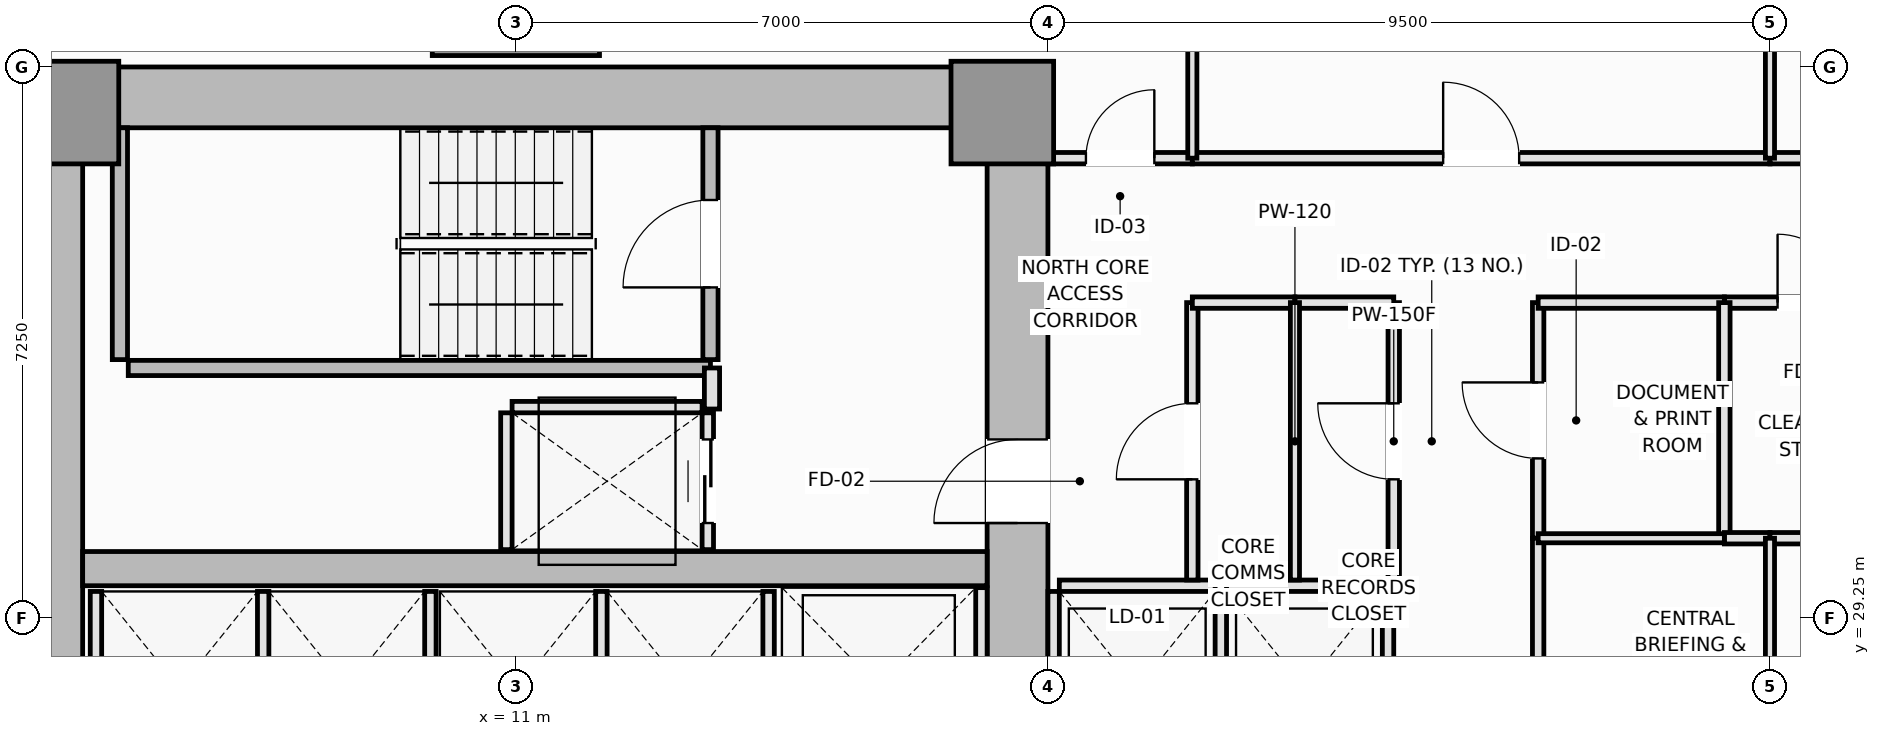
"""IFC4 building model, lengths in metres.
Left out: names, types, materials, properties, quantities, classifications, styles, units other than length and angle.
Written with IfcOpenShell. Run it as: python <this file> out.ifc"""

import sys

from ifc_helpers import new_model, si_unit, direction, frame, frame_2d, origin, origin_2d, place, context, subcontext, project, spatial, rectangle, extrude, element, fill, save


model = new_model("IFC4")
c1 = context("Model", 3, precision=1e-05, world=origin(), true_north=direction((0.0, 1.0)))
c2 = subcontext(c1, "Body", "Model", "MODEL_VIEW")
j1 = project(units=[si_unit("LENGTHUNIT", "METRE"), si_unit("PLANEANGLEUNIT", "RADIAN")], contexts=[c1])
p1 = place(None, origin())
s1 = spatial("IfcSite", under=j1, at=p1, CompositionType="ELEMENT")
p2 = place(p1, origin())
s2 = spatial("IfcBuilding", under=s1, at=p2, CompositionType="ELEMENT")
p3 = place(p2, frame((0.0, 0.0, 36.25)))
s3 = spatial("IfcBuildingStorey", under=s2, at=p3, CompositionType="ELEMENT", Elevation=36.25)
p4 = place(p3, frame((4.5, 36.1, 0.0), z_axis=(0.0, 0.0, 1.0), x_axis=(1.0, 0.0, 0.0)))
e1 = element("IfcWall", 1, at=p4, inside=s3, PredefinedType="SHEAR", context=c2, shape_type="SweptSolid", body=[
    extrude(rectangle(XDim=13.5, YDim=0.8, at=frame_2d((6.75, 0.0))), origin(), (0.0, 0.0, 1.0), 3.55),
])
p5 = place(p3, frame((4.9, 14.8, 0.0), z_axis=(0.0, 0.0, 1.0), x_axis=(0.0, 1.0, 0.0)))
e2 = element("IfcWall", 2, at=p5, inside=s3, PredefinedType="SHEAR", context=c2, shape_type="SweptSolid", body=[
    extrude(rectangle(XDim=20.9, YDim=0.8, at=frame_2d((10.45, 0.0))), origin(), (0.0, 0.0, 1.0), 3.55),
])
p6 = place(p3, frame((17.6, 27.05, 0.0), z_axis=(0.0, 0.0, 1.0), x_axis=(0.0, 1.0, 0.0)))
e3 = element("IfcWall", 3, at=p6, inside=s3, PredefinedType="SHEAR", context=c2, shape_type="SweptSolid", body=[
    extrude(rectangle(XDim=8.65, YDim=0.8, at=frame_2d((4.325, 0.0))), origin(), (0.0, 0.0, 1.0), 3.55),
])
p7 = place(p6, frame((3.45, 0.0, 0.0)))
e4 = element("IfcOpeningElement", 4, at=p7, cuts=e3, PredefinedType="OPENING", context=c2, shape_type="SweptSolid", body=[
    extrude(rectangle(XDim=1.1, YDim=2.15, at=frame_2d((0.55, 1.075))), frame((0.0, 0.41, 0.0), z_axis=(0.0, -1.0, 0.0), x_axis=(1.0, 0.0, 0.0)), (0.0, 0.0, 1.0), 0.82),
])
p8 = place(p3, frame((5.3, 29.9, 0.0), z_axis=(0.0, 0.0, 1.0), x_axis=(1.0, 0.0, 0.0)))
e5 = element("IfcWall", 5, at=p8, inside=s3, PredefinedType="SHEAR", context=c2, shape_type="SweptSolid", body=[
    extrude(rectangle(XDim=11.9, YDim=0.45, at=frame_2d((5.95, 0.0))), origin(), (0.0, 0.0, 1.0), 3.55),
])
for number, where, z_axis, x_axis in (
    (6, (5.1, 35.9, 0.0), (0.0, 0.0, 1.0), (1.0, 0.0, 0.0)),
    (7, (17.4, 35.9, 0.0), (0.0, 0.0, 1.0), (1.0, 0.0, 0.0)),
):
    element("IfcColumn", number, at=place(p3, frame(where, z_axis=z_axis, x_axis=x_axis)), inside=s3, PredefinedType="PILASTER", context=c2, shape_type="SweptSolid", body=[
        extrude(rectangle(XDim=1.35, YDim=1.35, at=origin_2d()), origin(), (0.0, 0.0, 1.0), 3.55),
    ])
p9 = place(p3, frame((11.0, 37.75, 0.0), z_axis=(0.0, 0.0, 1.0), x_axis=(1.0, 0.0, 0.0)))
e8 = element("IfcColumn", 8, at=p9, inside=s3, PredefinedType="COLUMN", context=c2, shape_type="SweptSolid", body=[
    extrude(rectangle(XDim=2.2, YDim=2.2, at=origin_2d()), origin(), (0.0, 0.0, 1.0), 3.55),
])
p10 = place(p3, frame((5.79, 32.65, 0.0), z_axis=(0.0, 0.0, 1.0), x_axis=(0.0, 1.0, 0.0)))
e9 = element("IfcWall", 9, at=p10, inside=s3, PredefinedType="SOLIDWALL", context=c2, shape_type="SweptSolid", body=[
    extrude(rectangle(XDim=3.05, YDim=0.2, at=frame_2d((1.525, 0.0))), origin(), (0.0, 0.0, 1.0), 3.55),
])
p11 = place(p3, frame((5.9, 32.54, 0.0), z_axis=(0.0, 0.0, 1.0), x_axis=(1.0, 0.0, 0.0)))
e10 = element("IfcWall", 10, at=p11, inside=s3, PredefinedType="SOLIDWALL", context=c2, shape_type="SweptSolid", body=[
    extrude(rectangle(XDim=7.66, YDim=0.2, at=frame_2d((3.83, 0.0))), origin(), (0.0, 0.0, 1.0), 3.55),
])
p12 = place(p3, frame((13.56, 32.65, 0.0), z_axis=(0.0, 0.0, 1.0), x_axis=(0.0, 1.0, 0.0)))
e11 = element("IfcWall", 11, at=p12, inside=s3, PredefinedType="SOLIDWALL", context=c2, shape_type="SweptSolid", body=[
    extrude(rectangle(XDim=3.05, YDim=0.2, at=frame_2d((1.525, 0.0))), origin(), (0.0, 0.0, 1.0), 3.55),
])
p13 = place(p12, frame((0.95, 0.0, 0.0)))
e12 = element("IfcOpeningElement", 12, at=p13, cuts=e11, PredefinedType="OPENING", context=c2, shape_type="SweptSolid", body=[
    extrude(rectangle(XDim=1.15, YDim=2.15, at=frame_2d((0.575, 1.075))), frame((0.0, 0.11, 0.0), z_axis=(0.0, -1.0, 0.0), x_axis=(1.0, 0.0, 0.0)), (0.0, 0.0, 1.0), 0.22),
])
p14 = place(p3, frame((18.15, 29.675, 0.0), z_axis=(0.0, 0.0, 1.0), x_axis=(1.0, 0.0, 0.0)))
e13 = element("IfcWall", 13, at=p14, inside=s3, PredefinedType="PARTITIONING", context=c2, shape_type="SweptSolid", body=[
    extrude(rectangle(XDim=2.05, YDim=0.15, at=frame_2d((1.025, 0.0))), origin(), (0.0, 0.0, 1.0), 3.37),
])
for number, where, z_axis, x_axis in (
    (14, (18.075, 27.05, 0.0), (0.0, 0.0, 1.0), (0.0, 1.0, 0.0)),
    (15, (20.275, 27.05, 0.0), (0.0, 0.0, 1.0), (0.0, 1.0, 0.0)),
):
    element("IfcWall", number, at=place(p3, frame(where, z_axis=z_axis, x_axis=x_axis)), inside=s3, PredefinedType="PARTITIONING", context=c2, shape_type="SweptSolid", body=[
        extrude(rectangle(XDim=2.55, YDim=0.15, at=frame_2d((1.275, 0.0))), origin(), (0.0, 0.0, 1.0), 3.37),
    ])
p15 = place(p3, frame((20.35, 29.675, 0.0), z_axis=(0.0, 0.0, 1.0), x_axis=(1.0, 0.0, 0.0)))
e16 = element("IfcWall", 16, at=p15, inside=s3, PredefinedType="PARTITIONING", context=c2, shape_type="SweptSolid", body=[
    extrude(rectangle(XDim=2.05, YDim=0.15, at=frame_2d((1.025, 0.0))), origin(), (0.0, 0.0, 1.0), 3.37),
])
for number, where, z_axis, x_axis in (
    (17, (22.475, 27.05, 0.0), (0.0, 0.0, 1.0), (0.0, 1.0, 0.0)),
    (18, (5.475, 27.05, 0.0), (0.0, 0.0, 1.0), (0.0, 1.0, 0.0)),
    (19, (7.675, 27.05, 0.0), (0.0, 0.0, 1.0), (0.0, 1.0, 0.0)),
    (20, (9.875, 27.05, 0.0), (0.0, 0.0, 1.0), (0.0, 1.0, 0.0)),
    (21, (12.125, 27.05, 0.0), (0.0, 0.0, 1.0), (0.0, 1.0, 0.0)),
    (22, (14.325, 27.05, 0.0), (0.0, 0.0, 1.0), (0.0, 1.0, 0.0)),
):
    element("IfcWall", number, at=place(p3, frame(where, z_axis=z_axis, x_axis=x_axis)), inside=s3, PredefinedType="PARTITIONING", context=c2, shape_type="SweptSolid", body=[
        extrude(rectangle(XDim=2.55, YDim=0.15, at=frame_2d((1.275, 0.0))), origin(), (0.0, 0.0, 1.0), 3.37),
    ])
p16 = place(p3, frame((17.125, 27.05, 0.0), z_axis=(0.0, 0.0, 1.0), x_axis=(0.0, 1.0, 0.0)))
e23 = element("IfcWall", 23, at=p16, inside=s3, PredefinedType="PARTITIONING", context=c2, shape_type="SweptSolid", body=[
    extrude(rectangle(XDim=2.6, YDim=0.15, at=frame_2d((1.3, 0.0))), origin(), (0.0, 0.0, 1.0), 3.37),
])
p17 = place(p3, frame((10.95, 32.025, 0.0), z_axis=(0.0, 0.0, 1.0), x_axis=(1.0, 0.0, 0.0)))
e24 = element("IfcWall", 24, at=p17, inside=s3, PredefinedType="PARTITIONING", context=c2, shape_type="SweptSolid", body=[
    extrude(rectangle(XDim=2.5, YDim=0.15, at=frame_2d((1.25, 0.0))), origin(), (0.0, 0.0, 1.0), 3.37),
])
p18 = place(p3, frame((10.875, 30.15, 0.0), z_axis=(0.0, 0.0, 1.0), x_axis=(0.0, 1.0, 0.0)))
e25 = element("IfcWall", 25, at=p18, inside=s3, PredefinedType="PARTITIONING", context=c2, shape_type="SweptSolid", body=[
    extrude(rectangle(XDim=1.8, YDim=0.15, at=frame_2d((0.9, 0.0))), origin(), (0.0, 0.0, 1.0), 3.37),
])
p19 = place(p3, frame((13.525, 30.15, 0.0), z_axis=(0.0, 0.0, 1.0), x_axis=(0.0, 1.0, 0.0)))
e26 = element("IfcWall", 26, at=p19, inside=s3, PredefinedType="PARTITIONING", context=c2, shape_type="SweptSolid", body=[
    extrude(rectangle(XDim=1.8, YDim=0.15, at=frame_2d((0.9, 0.0))), origin(), (0.0, 0.0, 1.0), 3.37),
])
p20 = place(p19, frame((0.35, 0.0, 0.0)))
e27 = element("IfcOpeningElement", 27, at=p20, cuts=e26, PredefinedType="OPENING", context=c2, shape_type="SweptSolid", body=[
    extrude(rectangle(XDim=1.1, YDim=2.2, at=frame_2d((0.55, 1.1))), frame((0.0, 0.085, 0.0), z_axis=(0.0, -1.0, 0.0), x_axis=(1.0, 0.0, 0.0)), (0.0, 0.0, 1.0), 0.17),
])
p21 = place(p3, frame((13.58, 32.0, 0.0), z_axis=(0.0, 0.0, 1.0), x_axis=(0.0, 1.0, 0.0)))
e28 = element("IfcWall", 28, at=p21, inside=s3, PredefinedType="PARTITIONING", context=c2, shape_type="SweptSolid", body=[
    extrude(rectangle(XDim=0.54, YDim=0.2, at=frame_2d((0.27, 0.0))), origin(), (0.0, 0.0, 1.0), 3.37),
])
p22 = place(p3, frame((22.55, 29.75, 0.0), z_axis=(0.0, 0.0, 1.0), x_axis=(0.0, 1.0, 0.0)))
e29 = element("IfcWall", 29, at=p22, inside=s3, PredefinedType="PARTITIONING", context=c2, shape_type="SweptSolid", body=[
    extrude(rectangle(XDim=3.65, YDim=0.15, at=frame_2d((1.825, 0.0))), origin(), (0.0, 0.0, 1.0), 3.01),
])
p23 = place(p22, frame((1.325, 0.0, 0.0)))
e30 = element("IfcOpeningElement", 30, at=p23, cuts=e29, PredefinedType="OPENING", context=c2, shape_type="SweptSolid", body=[
    extrude(rectangle(XDim=1.0, YDim=2.15, at=frame_2d((0.5, 1.075))), frame((0.0, 0.085, 0.0), z_axis=(0.0, -1.0, 0.0), x_axis=(1.0, 0.0, 0.0)), (0.0, 0.0, 1.0), 0.17),
])
p24 = place(p3, frame((24.45, 30.3, 0.0), z_axis=(0.0, 0.0, 1.0), x_axis=(0.0, 1.0, 0.0)))
e31 = element("IfcWall", 31, at=p24, inside=s3, PredefinedType="PARTITIONING", context=c2, shape_type="SweptSolid", body=[
    extrude(rectangle(XDim=3.1, YDim=0.15, at=frame_2d((1.55, 0.0))), origin(), (0.0, 0.0, 1.0), 3.37),
])
p25 = place(p24, frame((1.05, 0.0, 0.0)))
e32 = element("IfcOpeningElement", 32, at=p25, cuts=e31, PredefinedType="OPENING", context=c2, shape_type="SweptSolid", body=[
    extrude(rectangle(XDim=1.0, YDim=2.15, at=frame_2d((0.5, 1.075))), frame((0.0, 0.085, 0.0), z_axis=(0.0, -1.0, 0.0), x_axis=(1.0, 0.0, 0.0)), (0.0, 0.0, 1.0), 0.17),
])
p26 = place(p3, frame((24.45, 25.25, 0.0), z_axis=(0.0, 0.0, 1.0), x_axis=(0.0, 1.0, 0.0)))
e33 = element("IfcWall", 33, at=p26, inside=s3, PredefinedType="PARTITIONING", context=c2, shape_type="SweptSolid", body=[
    extrude(rectangle(XDim=5.05, YDim=0.15, at=frame_2d((2.525, 0.0))), origin(), (0.0, 0.0, 1.0), 3.37),
])
p27 = place(p26, frame((2.025, 0.0, 0.0)))
e34 = element("IfcOpeningElement", 34, at=p27, cuts=e33, PredefinedType="OPENING", context=c2, shape_type="SweptSolid", body=[
    extrude(rectangle(XDim=1.0, YDim=2.15, at=frame_2d((0.5, 1.075))), frame((0.0, 0.085, 0.0), z_axis=(0.0, -1.0, 0.0), x_axis=(1.0, 0.0, 0.0)), (0.0, 0.0, 1.0), 0.17),
])
p28 = place(p3, frame((19.9, 29.75, 0.0), z_axis=(0.0, 0.0, 1.0), x_axis=(0.0, 1.0, 0.0)))
e35 = element("IfcWall", 35, at=p28, inside=s3, PredefinedType="PARTITIONING", context=c2, shape_type="SweptSolid", body=[
    extrude(rectangle(XDim=3.65, YDim=0.15, at=frame_2d((1.825, 0.0))), origin(), (0.0, 0.0, 1.0), 3.37),
])
p29 = place(p28, frame((1.325, 0.0, 0.0)))
e36 = element("IfcOpeningElement", 36, at=p29, cuts=e35, PredefinedType="OPENING", context=c2, shape_type="SweptSolid", body=[
    extrude(rectangle(XDim=1.0, YDim=2.15, at=frame_2d((0.5, 1.075))), frame((0.0, 0.085, 0.0), z_axis=(0.0, -1.0, 0.0), x_axis=(1.0, 0.0, 0.0)), (0.0, 0.0, 1.0), 0.17),
])
p30 = place(p3, frame((19.9, 33.4, 0.0), z_axis=(0.0, 0.0, 1.0), x_axis=(1.0, 0.0, 0.0)))
e37 = element("IfcWall", 37, at=p30, inside=s3, PredefinedType="PARTITIONING", context=c2, shape_type="SweptSolid", body=[
    extrude(rectangle(XDim=1.35, YDim=0.15, at=frame_2d((0.675, 0.0))), origin(), (0.0, 0.0, 1.0), 3.37),
])
p31 = place(p3, frame((21.25, 33.4, 0.0), z_axis=(0.0, 0.0, 1.0), x_axis=(1.0, 0.0, 0.0)))
e38 = element("IfcWall", 38, at=p31, inside=s3, PredefinedType="PARTITIONING", context=c2, shape_type="SweptSolid", body=[
    extrude(rectangle(XDim=1.3, YDim=0.15, at=frame_2d((0.65, 0.0))), origin(), (0.0, 0.0, 1.0), 3.37),
])
p32 = place(p3, frame((26.9, 33.4, 0.0), z_axis=(0.0, 0.0, 1.0), x_axis=(1.0, 0.0, 0.0)))
e39 = element("IfcWall", 39, at=p32, inside=s3, PredefinedType="PLUMBINGWALL", context=c2, shape_type="SweptSolid", body=[
    extrude(rectangle(XDim=2.3, YDim=0.15, at=frame_2d((1.15, 0.0))), origin(), (0.0, 0.0, 1.0), 3.37),
])
p33 = place(p32, frame((0.7, 0.0, 0.0)))
e40 = element("IfcOpeningElement", 40, at=p33, cuts=e39, PredefinedType="OPENING", context=c2, shape_type="SweptSolid", body=[
    extrude(rectangle(XDim=0.9, YDim=2.1, at=frame_2d((0.45, 1.05))), frame((0.0, 0.085, 0.0), z_axis=(0.0, -1.0, 0.0), x_axis=(1.0, 0.0, 0.0)), (0.0, 0.0, 1.0), 0.17),
])
p34 = place(p3, frame((24.45, 33.4, 0.0), z_axis=(0.0, 0.0, 1.0), x_axis=(1.0, 0.0, 0.0)))
e41 = element("IfcWall", 41, at=p34, inside=s3, PredefinedType="PARTITIONING", context=c2, shape_type="SweptSolid", body=[
    extrude(rectangle(XDim=2.45, YDim=0.15, at=frame_2d((1.225, 0.0))), origin(), (0.0, 0.0, 1.0), 3.37),
])
p35 = place(p3, frame((18.0, 35.3, 0.0), z_axis=(0.0, 0.0, 1.0), x_axis=(1.0, 0.0, 0.0)))
e42 = element("IfcWall", 42, at=p35, inside=s3, PredefinedType="PARTITIONING", context=c2, shape_type="SweptSolid", body=[
    extrude(rectangle(XDim=1.9, YDim=0.15, at=frame_2d((0.95, 0.0))), origin(), (0.0, 0.0, 1.0), 3.37),
])
p36 = place(p35, frame((0.5, 0.0, 0.0)))
e43 = element("IfcOpeningElement", 43, at=p36, cuts=e42, PredefinedType="OPENING", context=c2, shape_type="SweptSolid", body=[
    extrude(rectangle(XDim=0.9, YDim=2.1, at=frame_2d((0.45, 1.05))), frame((0.0, 0.085, 0.0), z_axis=(0.0, -1.0, 0.0), x_axis=(1.0, 0.0, 0.0)), (0.0, 0.0, 1.0), 0.17),
])
p37 = place(p3, frame((19.9, 35.3, 0.0), z_axis=(0.0, 0.0, 1.0), x_axis=(1.0, 0.0, 0.0)))
e44 = element("IfcWall", 44, at=p37, inside=s3, PredefinedType="PARTITIONING", context=c2, shape_type="SweptSolid", body=[
    extrude(rectangle(XDim=7.6, YDim=0.15, at=frame_2d((3.8, 0.0))), origin(), (0.0, 0.0, 1.0), 3.37),
])
p38 = place(p37, frame((3.3, 0.0, 0.0)))
e45 = element("IfcOpeningElement", 45, at=p38, cuts=e44, PredefinedType="OPENING", context=c2, shape_type="SweptSolid", body=[
    extrude(rectangle(XDim=1.0, YDim=2.15, at=frame_2d((0.5, 1.075))), frame((0.0, 0.085, 0.0), z_axis=(0.0, -1.0, 0.0), x_axis=(1.0, 0.0, 0.0)), (0.0, 0.0, 1.0), 0.17),
])
p39 = place(p3, frame((27.5, 35.3, 0.0), z_axis=(0.0, 0.0, 1.0), x_axis=(1.0, 0.0, 0.0)))
e46 = element("IfcWall", 46, at=p39, inside=s3, PredefinedType="PARTITIONING", context=c2, shape_type="SweptSolid", body=[
    extrude(rectangle(XDim=6.8, YDim=0.15, at=frame_2d((3.4, 0.0))), origin(), (0.0, 0.0, 1.0), 3.37),
])
p40 = place(p39, frame((2.9, 0.0, 0.0)))
e47 = element("IfcOpeningElement", 47, at=p40, cuts=e46, PredefinedType="OPENING", context=c2, shape_type="SweptSolid", body=[
    extrude(rectangle(XDim=1.0, YDim=2.15, at=frame_2d((0.5, 1.075))), frame((0.0, 0.085, 0.0), z_axis=(0.0, -1.0, 0.0), x_axis=(1.0, 0.0, 0.0)), (0.0, 0.0, 1.0), 0.17),
])
p41 = place(p3, frame((21.25, 29.75, 0.0), z_axis=(0.0, 0.0, 1.0), x_axis=(0.0, 1.0, 0.0)))
e48 = element("IfcWall", 48, at=p41, inside=s3, PredefinedType="PARTITIONING", context=c2, shape_type="SweptSolid", body=[
    extrude(rectangle(XDim=3.65, YDim=0.12, at=frame_2d((1.825, 0.0))), origin(), (0.0, 0.0, 1.0), 3.37),
])
p42 = place(p3, frame((26.9, 30.3, 0.0), z_axis=(0.0, 0.0, 1.0), x_axis=(0.0, 1.0, 0.0)))
e49 = element("IfcWall", 49, at=p42, inside=s3, PredefinedType="PLUMBINGWALL", context=c2, shape_type="SweptSolid", body=[
    extrude(rectangle(XDim=3.1, YDim=0.15, at=frame_2d((1.55, 0.0))), origin(), (0.0, 0.0, 1.0), 3.37),
])
p43 = place(p3, frame((26.9, 30.3, 0.0), z_axis=(0.0, 0.0, 1.0), x_axis=(1.0, 0.0, 0.0)))
e50 = element("IfcWall", 50, at=p43, inside=s3, PredefinedType="PLUMBINGWALL", context=c2, shape_type="SweptSolid", body=[
    extrude(rectangle(XDim=0.6, YDim=0.15, at=frame_2d((0.3, 0.0))), origin(), (0.0, 0.0, 1.0), 3.37),
])
p44 = place(p3, frame((27.5, 30.3, 0.0), z_axis=(0.0, 0.0, 1.0), x_axis=(1.0, 0.0, 0.0)))
e51 = element("IfcWall", 51, at=p44, inside=s3, PredefinedType="PLUMBINGWALL", context=c2, shape_type="SweptSolid", body=[
    extrude(rectangle(XDim=1.7, YDim=0.15, at=frame_2d((0.85, 0.0))), origin(), (0.0, 0.0, 1.0), 3.37),
])
p45 = place(p3, frame((24.45, 30.3, 0.0), z_axis=(0.0, 0.0, 1.0), x_axis=(1.0, 0.0, 0.0)))
e52 = element("IfcWall", 52, at=p45, inside=s3, PredefinedType="PARTITIONING", context=c2, shape_type="SweptSolid", body=[
    extrude(rectangle(XDim=2.45, YDim=0.12, at=frame_2d((1.225, 0.0))), origin(), (0.0, 0.0, 1.0), 3.37),
])
p46 = place(p3, frame((27.5, 25.25, 0.0), z_axis=(0.0, 0.0, 1.0), x_axis=(0.0, 1.0, 0.0)))
e53 = element("IfcWall", 53, at=p46, inside=s3, PredefinedType="PARTITIONING", context=c2, shape_type="SweptSolid", body=[
    extrude(rectangle(XDim=5.05, YDim=0.12, at=frame_2d((2.525, 0.0))), origin(), (0.0, 0.0, 1.0), 3.37),
])
p47 = place(p3, frame((19.9, 35.3, 0.0), z_axis=(0.0, 0.0, 1.0), x_axis=(0.0, 1.0, 0.0)))
e54 = element("IfcWall", 54, at=p47, inside=s3, PredefinedType="PARTITIONING", context=c2, shape_type="SweptSolid", body=[
    extrude(rectangle(XDim=12.69, YDim=0.12, at=frame_2d((6.345, 0.0))), origin(), (0.0, 0.0, 1.0), 3.37),
])
p48 = place(p3, frame((27.5, 35.3, 0.0), z_axis=(0.0, 0.0, 1.0), x_axis=(0.0, 1.0, 0.0)))
e55 = element("IfcWall", 55, at=p48, inside=s3, PredefinedType="PARTITIONING", context=c2, shape_type="SweptSolid", body=[
    extrude(rectangle(XDim=12.69, YDim=0.12, at=frame_2d((6.345, 0.0))), origin(), (0.0, 0.0, 1.0), 2.82),
])
p49 = place(p13, origin())
e56 = element("IfcDoor", 56, at=p49, inside=s3, OperationType="SINGLE_SWING_LEFT", PredefinedType="DOOR", context=c2, shape_type="SweptSolid", body=[
    extrude(rectangle(XDim=1.15, YDim=2.15, at=frame_2d((0.575, 1.075))), frame((0.0, 0.025, 0.0), z_axis=(0.0, -1.0, 0.0), x_axis=(1.0, 0.0, 0.0)), (0.0, 0.0, 1.0), 0.05),
])
fill(e12, e56)
p50 = place(p20, origin())
e57 = element("IfcDoor", 57, at=p50, inside=s3, OperationType="DOUBLE_DOOR_SLIDING", PredefinedType="DOOR", context=c2, shape_type="SweptSolid", body=[
    extrude(rectangle(XDim=1.1, YDim=2.2, at=frame_2d((0.55, 1.1))), frame((0.0, 0.025, 0.0), z_axis=(0.0, -1.0, 0.0), x_axis=(1.0, 0.0, 0.0)), (0.0, 0.0, 1.0), 0.05),
])
fill(e27, e57)
p51 = place(p7, origin())
e58 = element("IfcDoor", 58, at=p51, inside=s3, OperationType="SINGLE_SWING_LEFT", PredefinedType="DOOR", context=c2, shape_type="SweptSolid", body=[
    extrude(rectangle(XDim=1.1, YDim=2.15, at=frame_2d((0.55, 1.075))), frame((0.0, 0.025, 0.0), z_axis=(0.0, -1.0, 0.0), x_axis=(1.0, 0.0, 0.0)), (0.0, 0.0, 1.0), 0.05),
])
fill(e4, e58)
p52 = place(p23, origin())
e59 = element("IfcDoor", 59, at=p52, inside=s3, OperationType="SINGLE_SWING_RIGHT", PredefinedType="DOOR", context=c2, shape_type="SweptSolid", body=[
    extrude(rectangle(XDim=1.0, YDim=2.15, at=frame_2d((0.5, 1.075))), frame((0.0, 0.025, 0.0), z_axis=(0.0, -1.0, 0.0), x_axis=(1.0, 0.0, 0.0)), (0.0, 0.0, 1.0), 0.05),
])
fill(e30, e59)
p53 = place(p25, origin())
e60 = element("IfcDoor", 60, at=p53, inside=s3, OperationType="SINGLE_SWING_RIGHT", PredefinedType="DOOR", context=c2, shape_type="SweptSolid", body=[
    extrude(rectangle(XDim=1.0, YDim=2.15, at=frame_2d((0.5, 1.075))), frame((0.0, 0.025, 0.0), z_axis=(0.0, -1.0, 0.0), x_axis=(1.0, 0.0, 0.0)), (0.0, 0.0, 1.0), 0.05),
])
fill(e32, e60)
p54 = place(p29, origin())
e61 = element("IfcDoor", 61, at=p54, inside=s3, OperationType="SINGLE_SWING_LEFT", PredefinedType="DOOR", context=c2, shape_type="SweptSolid", body=[
    extrude(rectangle(XDim=1.0, YDim=2.15, at=frame_2d((0.5, 1.075))), frame((0.0, 0.025, 0.0), z_axis=(0.0, -1.0, 0.0), x_axis=(1.0, 0.0, 0.0)), (0.0, 0.0, 1.0), 0.05),
])
fill(e36, e61)
p55 = place(p33, origin())
e62 = element("IfcDoor", 62, at=p55, inside=s3, OperationType="SINGLE_SWING_LEFT", PredefinedType="DOOR", context=c2, shape_type="SweptSolid", body=[
    extrude(rectangle(XDim=0.9, YDim=2.1, at=frame_2d((0.45, 1.05))), frame((0.0, 0.025, 0.0), z_axis=(0.0, -1.0, 0.0), x_axis=(1.0, 0.0, 0.0)), (0.0, 0.0, 1.0), 0.05),
])
fill(e40, e62)
p56 = place(p36, origin())
e63 = element("IfcDoor", 63, at=p56, inside=s3, OperationType="SINGLE_SWING_RIGHT", PredefinedType="DOOR", context=c2, shape_type="SweptSolid", body=[
    extrude(rectangle(XDim=0.9, YDim=2.1, at=frame_2d((0.45, 1.05))), frame((0.0, 0.025, 0.0), z_axis=(0.0, -1.0, 0.0), x_axis=(1.0, 0.0, 0.0)), (0.0, 0.0, 1.0), 0.05),
])
fill(e43, e63)
p57 = place(p38, origin())
e64 = element("IfcDoor", 64, at=p57, inside=s3, OperationType="SINGLE_SWING_LEFT", PredefinedType="DOOR", context=c2, shape_type="SweptSolid", body=[
    extrude(rectangle(XDim=1.0, YDim=2.15, at=frame_2d((0.5, 1.075))), frame((0.0, 0.025, 0.0), z_axis=(0.0, -1.0, 0.0), x_axis=(1.0, 0.0, 0.0)), (0.0, 0.0, 1.0), 0.05),
])
fill(e45, e64)
save(model, sys.argv[1])
